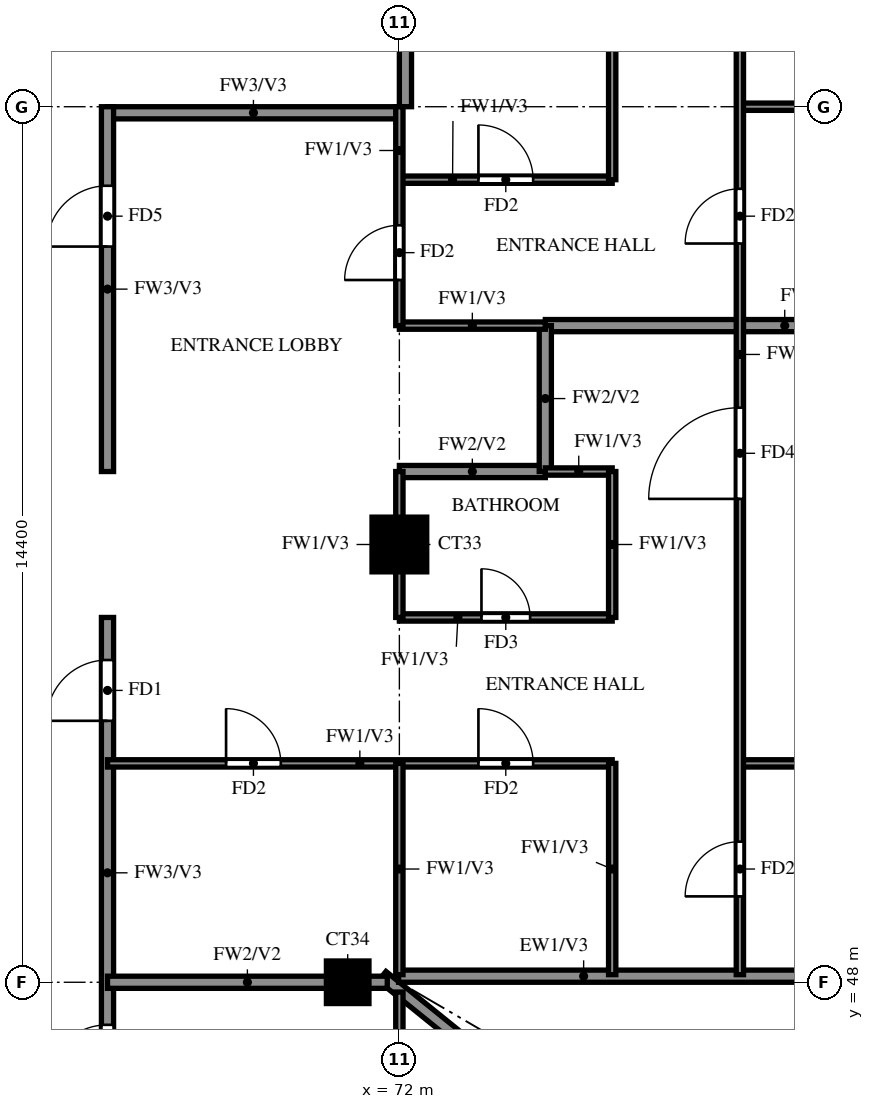
"""IFC4 building model, lengths in metres.
Left out: names, types, materials, properties, quantities, classifications, styles, units other than length and angle.
Written with IfcOpenShell. Run it as: python <this file> out.ifc"""

import sys

from ifc_helpers import new_model, si_unit, direction, frame, frame_2d, origin, origin_2d, place, context, subcontext, project, spatial, rectangle, extrude, source, transform, mapped, element, fill, save


model = new_model("IFC4")
c1 = context("Model", 3, precision=1e-05, world=origin(), true_north=direction((0.0, 1.0)))
c2 = subcontext(c1, "Body", "Model", "MODEL_VIEW")
j1 = project(units=[si_unit("LENGTHUNIT", "METRE"), si_unit("PLANEANGLEUNIT", "RADIAN")], contexts=[c1])
p1 = place(None, origin())
s1 = spatial("IfcSite", under=j1, at=p1, CompositionType="ELEMENT")
p2 = place(p1, origin())
s2 = spatial("IfcBuilding", under=s1, at=p2, CompositionType="ELEMENT")
p3 = place(p2, frame((0.0, 0.0, 211.5)))
s3 = spatial("IfcBuildingStorey", under=s2, at=p3, CompositionType="ELEMENT", Elevation=211.5)
m1 = source(origin(), c2, "Body", "SweptSolid", [
    extrude(rectangle(XDim=0.7, YDim=0.7, at=origin_2d()), origin(), (0.0, 0.0, 1.0), 3.22),
])
p4 = place(p3, frame((71.15, 48.0, 0.0), z_axis=(0.0, 0.0, 1.0), x_axis=(1.0, 0.0, 0.0)))
e1 = element("IfcColumn", 1, at=p4, inside=s3, PredefinedType="COLUMN", context=c2, shape_type="MappedRepresentation", body=[
    mapped(m1, transform((0.0, 0.0, 0.0))),
])
m2 = source(origin(), c2, "Body", "SweptSolid", [
    extrude(rectangle(XDim=0.9, YDim=0.9, at=origin_2d()), origin(), (0.0, 0.0, 1.0), 3.22),
])
p5 = place(p3, frame((72.0, 55.2, 0.0), z_axis=(0.0, 0.0, 1.0), x_axis=(1.0, 0.0, 0.0)))
e2 = element("IfcColumn", 2, at=p5, inside=s3, PredefinedType="COLUMN", context=c2, shape_type="MappedRepresentation", body=[
    mapped(m2, transform((0.0, 0.0, 0.0))),
])
p6 = place(p3, frame((81.907, 39.87, 0.0), z_axis=(0.0, 0.0, 1.0), x_axis=(-0.777936274417, 0.62834318087, 0.0)))
e3 = element("IfcWall", 3, at=p6, inside=s3, PredefinedType="SOLIDWALL", context=c2, shape_type="SweptSolid", body=[
    extrude(rectangle(XDim=13.099, YDim=0.2, at=frame_2d((6.549, 0.0))), origin(), (0.0, 0.0, 1.0), 3.22),
])
p7 = place(p6, frame((2.201, 0.0, 0.0)))
e4 = element("IfcOpeningElement", 4, at=p7, cuts=e3, PredefinedType="OPENING", context=c2, shape_type="SweptSolid", body=[
    extrude(rectangle(XDim=1.8, YDim=2.4, at=frame_2d((0.9, 1.2))), frame((0.0, 0.11, 0.0), z_axis=(0.0, -1.0, 0.0), x_axis=(1.0, 0.0, 0.0)), (0.0, 0.0, 1.0), 0.22),
])
p8 = place(p6, frame((9.938, 0.0, 1.5)))
e5 = element("IfcOpeningElement", 5, at=p8, cuts=e3, PredefinedType="OPENING", context=c2, shape_type="SweptSolid", body=[
    extrude(rectangle(XDim=0.9, YDim=0.9, at=frame_2d((0.45, 0.45))), frame((0.0, 0.11, 0.0), z_axis=(0.0, -1.0, 0.0), x_axis=(1.0, 0.0, 0.0)), (0.0, 0.0, 1.0), 0.22),
])
p9 = place(p3, frame((71.987, 48.1, 0.0), z_axis=(0.0, 0.0, 1.0), x_axis=(1.0, 0.0, 0.0)))
e6 = element("IfcWall", 6, at=p9, inside=s3, PredefinedType="SOLIDWALL", context=c2, shape_type="SweptSolid", body=[
    extrude(rectangle(XDim=6.763, YDim=0.2, at=frame_2d((3.381, 0.0))), origin(), (0.0, 0.0, 1.0), 3.22),
])
p10 = place(p3, frame((67.2, 62.3, 0.0), z_axis=(0.0, 0.0, 1.0), x_axis=(1.0, 0.0, 0.0)))
e7 = element("IfcWall", 7, at=p10, inside=s3, PredefinedType="SOLIDWALL", context=c2, shape_type="SweptSolid", body=[
    extrude(rectangle(XDim=4.8, YDim=0.2, at=frame_2d((2.4, 0.0))), origin(), (0.0, 0.0, 1.0), 3.22),
])
p11 = place(p3, frame((67.2, 45.6, 0.0), z_axis=(0.0, 0.0, 1.0), x_axis=(0.0, 1.0, 0.0)))
e8 = element("IfcWall", 8, at=p11, inside=s3, PredefinedType="SOLIDWALL", context=c2, shape_type="SweptSolid", body=[
    extrude(rectangle(XDim=8.4, YDim=0.2, at=frame_2d((4.2, 0.0))), origin(), (0.0, 0.0, 1.0), 3.22),
])
p12 = place(p11, frame((6.7, 0.0, 0.0)))
e9 = element("IfcOpeningElement", 9, at=p12, cuts=e8, PredefinedType="OPENING", context=c2, shape_type="SweptSolid", body=[
    extrude(rectangle(XDim=1.0, YDim=2.1, at=frame_2d((0.5, 1.05))), frame((0.0, 0.11, 0.0), z_axis=(0.0, -1.0, 0.0), x_axis=(1.0, 0.0, 0.0)), (0.0, 0.0, 1.0), 0.22),
])
p13 = place(p11, frame((0.7, 0.0, 0.0)))
e10 = element("IfcOpeningElement", 10, at=p13, cuts=e8, PredefinedType="OPENING", context=c2, shape_type="SweptSolid", body=[
    extrude(rectangle(XDim=1.0, YDim=2.1, at=frame_2d((0.5, 1.05))), frame((0.0, 0.11, 0.0), z_axis=(0.0, -1.0, 0.0), x_axis=(1.0, 0.0, 0.0)), (0.0, 0.0, 1.0), 0.22),
])
p14 = place(p3, frame((67.2, 56.4, 0.0), z_axis=(0.0, 0.0, 1.0), x_axis=(0.0, 1.0, 0.0)))
e11 = element("IfcWall", 11, at=p14, inside=s3, PredefinedType="SOLIDWALL", context=c2, shape_type="SweptSolid", body=[
    extrude(rectangle(XDim=6.0, YDim=0.2, at=frame_2d((3.0, 0.0))), origin(), (0.0, 0.0, 1.0), 3.22),
])
p15 = place(p14, frame((3.7, 0.0, 0.0)))
e12 = element("IfcOpeningElement", 12, at=p15, cuts=e11, PredefinedType="OPENING", context=c2, shape_type="SweptSolid", body=[
    extrude(rectangle(XDim=1.0, YDim=2.1, at=frame_2d((0.5, 1.05))), frame((0.0, 0.11, 0.0), z_axis=(0.0, -1.0, 0.0), x_axis=(1.0, 0.0, 0.0)), (0.0, 0.0, 1.0), 0.22),
])
p16 = place(p3, frame((72.1, 62.4, 0.0), z_axis=(0.0, 0.0, 1.0), x_axis=(0.0, 1.0, 0.0)))
e13 = element("IfcWall", 13, at=p16, inside=s3, PredefinedType="SOLIDWALL", context=c2, shape_type="SweptSolid", body=[
    extrude(rectangle(XDim=15.6, YDim=0.2, at=frame_2d((7.8, 0.0))), origin(), (0.0, 0.0, 1.0), 3.22),
])
p17 = place(p3, frame((67.2, 48.0, 0.0), z_axis=(0.0, 0.0, 1.0), x_axis=(1.0, 0.0, 0.0)))
e14 = element("IfcWall", 14, at=p17, inside=s3, PredefinedType="SOLIDWALL", context=c2, shape_type="SweptSolid", body=[
    extrude(rectangle(XDim=4.601, YDim=0.2, at=frame_2d((2.301, 0.0))), origin(), (0.0, 0.0, 1.0), 3.22),
])
p18 = place(p3, frame((72.0, 56.4, 0.0), z_axis=(0.0, 0.0, 1.0), x_axis=(1.0, 0.0, 0.0)))
e15 = element("IfcWall", 15, at=p18, inside=s3, PredefinedType="SOLIDWALL", context=c2, shape_type="SweptSolid", body=[
    extrude(rectangle(XDim=2.4, YDim=0.2, at=frame_2d((1.2, 0.0))), origin(), (0.0, 0.0, 1.0), 3.22),
])
p19 = place(p3, frame((74.4, 58.8, 0.0), z_axis=(0.0, 0.0, 1.0), x_axis=(1.0, 0.0, 0.0)))
e16 = element("IfcWall", 16, at=p19, inside=s3, PredefinedType="SOLIDWALL", context=c2, shape_type="SweptSolid", body=[
    extrude(rectangle(XDim=7.875, YDim=0.2, at=frame_2d((3.938, 0.0))), origin(), (0.0, 0.0, 1.0), 2.32),
])
p20 = place(p3, frame((74.4, 56.4, 0.0), z_axis=(0.0, 0.0, 1.0), x_axis=(0.0, 1.0, 0.0)))
e17 = element("IfcWall", 17, at=p20, inside=s3, PredefinedType="SOLIDWALL", context=c2, shape_type="SweptSolid", body=[
    extrude(rectangle(XDim=2.4, YDim=0.2, at=frame_2d((1.2, 0.0))), origin(), (0.0, 0.0, 1.0), 3.22),
])
p21 = place(p3, frame((67.2, 51.6, 0.0), z_axis=(0.0, 0.0, 1.0), x_axis=(1.0, 0.0, 0.0)))
e18 = element("IfcWall", 18, at=p21, inside=s3, PredefinedType="PARTITIONING", context=c2, shape_type="SweptSolid", body=[
    extrude(rectangle(XDim=8.3, YDim=0.12, at=frame_2d((4.15, 0.0))), origin(), (0.0, 0.0, 1.0), 3.22),
])
p22 = place(p21, frame((6.1, 0.0, 0.0)))
e19 = element("IfcOpeningElement", 19, at=p22, cuts=e18, PredefinedType="OPENING", context=c2, shape_type="SweptSolid", body=[
    extrude(rectangle(XDim=0.9, YDim=2.1, at=frame_2d((0.45, 1.05))), frame((0.0, 0.07, 0.0), z_axis=(0.0, -1.0, 0.0), x_axis=(1.0, 0.0, 0.0)), (0.0, 0.0, 1.0), 0.14),
])
p23 = place(p21, frame((1.95, 0.0, 0.0)))
e20 = element("IfcOpeningElement", 20, at=p23, cuts=e18, PredefinedType="OPENING", context=c2, shape_type="SweptSolid", body=[
    extrude(rectangle(XDim=0.9, YDim=2.1, at=frame_2d((0.45, 1.05))), frame((0.0, 0.07, 0.0), z_axis=(0.0, -1.0, 0.0), x_axis=(1.0, 0.0, 0.0)), (0.0, 0.0, 1.0), 0.14),
])
p24 = place(p3, frame((77.6, 51.6, 0.0), z_axis=(0.0, 0.0, 1.0), x_axis=(1.0, 0.0, 0.0)))
e21 = element("IfcWall", 21, at=p24, inside=s3, PredefinedType="PARTITIONING", context=c2, shape_type="SweptSolid", body=[
    extrude(rectangle(XDim=4.675, YDim=0.12, at=frame_2d((2.337, 0.0))), origin(), (0.0, 0.0, 1.0), 2.32),
])
p25 = place(p3, frame((72.0, 54.0, 0.0), z_axis=(0.0, 0.0, 1.0), x_axis=(1.0, 0.0, 0.0)))
e22 = element("IfcWall", 22, at=p25, inside=s3, PredefinedType="PARTITIONING", context=c2, shape_type="SweptSolid", body=[
    extrude(rectangle(XDim=3.5, YDim=0.12, at=frame_2d((1.75, 0.0))), origin(), (0.0, 0.0, 1.0), 3.22),
])
p26 = place(p25, frame((1.35, 0.0, 0.0)))
e23 = element("IfcOpeningElement", 23, at=p26, cuts=e22, PredefinedType="OPENING", context=c2, shape_type="SweptSolid", body=[
    extrude(rectangle(XDim=0.8, YDim=2.1, at=frame_2d((0.4, 1.05))), frame((0.0, 0.07, 0.0), z_axis=(0.0, -1.0, 0.0), x_axis=(1.0, 0.0, 0.0)), (0.0, 0.0, 1.0), 0.14),
])
p27 = place(p3, frame((74.4, 56.4, 0.0), z_axis=(0.0, 0.0, 1.0), x_axis=(1.0, 0.0, 0.0)))
e24 = element("IfcWall", 24, at=p27, inside=s3, PredefinedType="PARTITIONING", context=c2, shape_type="SweptSolid", body=[
    extrude(rectangle(XDim=1.1, YDim=0.12, at=frame_2d((0.55, 0.0))), origin(), (0.0, 0.0, 1.0), 3.22),
])
p28 = place(p3, frame((72.0, 58.8, 0.0), z_axis=(0.0, 0.0, 1.0), x_axis=(1.0, 0.0, 0.0)))
e25 = element("IfcWall", 25, at=p28, inside=s3, PredefinedType="PARTITIONING", context=c2, shape_type="SweptSolid", body=[
    extrude(rectangle(XDim=2.4, YDim=0.12, at=frame_2d((1.2, 0.0))), origin(), (0.0, 0.0, 1.0), 3.22),
])
p29 = place(p3, frame((72.0, 61.2, 0.0), z_axis=(0.0, 0.0, 1.0), x_axis=(1.0, 0.0, 0.0)))
e26 = element("IfcWall", 26, at=p29, inside=s3, PredefinedType="PARTITIONING", context=c2, shape_type="SweptSolid", body=[
    extrude(rectangle(XDim=3.5, YDim=0.12, at=frame_2d((1.75, 0.0))), origin(), (0.0, 0.0, 1.0), 3.22),
])
p30 = place(p29, frame((1.3, 0.0, 0.0)))
e27 = element("IfcOpeningElement", 27, at=p30, cuts=e26, PredefinedType="OPENING", context=c2, shape_type="SweptSolid", body=[
    extrude(rectangle(XDim=0.9, YDim=2.1, at=frame_2d((0.45, 1.05))), frame((0.0, 0.07, 0.0), z_axis=(0.0, -1.0, 0.0), x_axis=(1.0, 0.0, 0.0)), (0.0, 0.0, 1.0), 0.14),
])
p31 = place(p3, frame((77.6, 62.4, 0.0), z_axis=(0.0, 0.0, 1.0), x_axis=(1.0, 0.0, 0.0)))
e28 = element("IfcWall", 28, at=p31, inside=s3, PredefinedType="PARTITIONING", context=c2, shape_type="SweptSolid", body=[
    extrude(rectangle(XDim=4.675, YDim=0.12, at=frame_2d((2.337, 0.0))), origin(), (0.0, 0.0, 1.0), 3.22),
])
p32 = place(p3, frame((72.0, 39.725, 0.0), z_axis=(0.0, 0.0, 1.0), x_axis=(0.0, 1.0, 0.0)))
e29 = element("IfcWall", 29, at=p32, inside=s3, PredefinedType="PARTITIONING", context=c2, shape_type="SweptSolid", body=[
    extrude(rectangle(XDim=8.114, YDim=0.12, at=frame_2d((4.057, 0.0))), origin(), (0.0, 0.0, 1.0), 2.32),
])
p33 = place(p32, frame((1.788, 0.0, 0.0)))
e30 = element("IfcOpeningElement", 30, at=p33, cuts=e29, PredefinedType="OPENING", context=c2, shape_type="SweptSolid", body=[
    extrude(rectangle(XDim=1.5, YDim=2.1, at=frame_2d((0.75, 1.05))), frame((0.0, 0.07, 0.0), z_axis=(0.0, -1.0, 0.0), x_axis=(1.0, 0.0, 0.0)), (0.0, 0.0, 1.0), 0.14),
])
p34 = place(p32, frame((4.575, 0.0, 0.0)))
e31 = element("IfcOpeningElement", 31, at=p34, cuts=e29, PredefinedType="OPENING", context=c2, shape_type="SweptSolid", body=[
    extrude(rectangle(XDim=0.8, YDim=2.1, at=frame_2d((0.4, 1.05))), frame((0.0, 0.07, 0.0), z_axis=(0.0, -1.0, 0.0), x_axis=(1.0, 0.0, 0.0)), (0.0, 0.0, 1.0), 0.14),
])
p35 = place(p3, frame((72.0, 48.125, 0.0), z_axis=(0.0, 0.0, 1.0), x_axis=(0.0, 1.0, 0.0)))
e32 = element("IfcWall", 32, at=p35, inside=s3, PredefinedType="PARTITIONING", context=c2, shape_type="SweptSolid", body=[
    extrude(rectangle(XDim=3.475, YDim=0.12, at=frame_2d((1.738, 0.0))), origin(), (0.0, 0.0, 1.0), 3.22),
])
p36 = place(p3, frame((72.0, 54.0, 0.0), z_axis=(0.0, 0.0, 1.0), x_axis=(0.0, 1.0, 0.0)))
e33 = element("IfcWall", 33, at=p36, inside=s3, PredefinedType="PARTITIONING", context=c2, shape_type="SweptSolid", body=[
    extrude(rectangle(XDim=2.4, YDim=0.12, at=frame_2d((1.2, 0.0))), origin(), (0.0, 0.0, 1.0), 3.22),
])
p37 = place(p3, frame((72.0, 58.8, 0.0), z_axis=(0.0, 0.0, 1.0), x_axis=(0.0, 1.0, 0.0)))
e34 = element("IfcWall", 34, at=p37, inside=s3, PredefinedType="PARTITIONING", context=c2, shape_type="SweptSolid", body=[
    extrude(rectangle(XDim=3.6, YDim=0.12, at=frame_2d((1.8, 0.0))), origin(), (0.0, 0.0, 1.0), 3.22),
])
p38 = place(p37, frame((0.75, 0.0, 0.0)))
e35 = element("IfcOpeningElement", 35, at=p38, cuts=e34, PredefinedType="OPENING", context=c2, shape_type="SweptSolid", body=[
    extrude(rectangle(XDim=0.9, YDim=2.1, at=frame_2d((0.45, 1.05))), frame((0.0, 0.07, 0.0), z_axis=(0.0, -1.0, 0.0), x_axis=(1.0, 0.0, 0.0)), (0.0, 0.0, 1.0), 0.14),
])
p39 = place(p3, frame((75.5, 48.125, 0.0), z_axis=(0.0, 0.0, 1.0), x_axis=(0.0, 1.0, 0.0)))
e36 = element("IfcWall", 36, at=p39, inside=s3, PredefinedType="PARTITIONING", context=c2, shape_type="SweptSolid", body=[
    extrude(rectangle(XDim=3.475, YDim=0.12, at=frame_2d((1.738, 0.0))), origin(), (0.0, 0.0, 1.0), 3.22),
])
p40 = place(p3, frame((75.5, 54.0, 0.0), z_axis=(0.0, 0.0, 1.0), x_axis=(0.0, 1.0, 0.0)))
e37 = element("IfcWall", 37, at=p40, inside=s3, PredefinedType="PARTITIONING", context=c2, shape_type="SweptSolid", body=[
    extrude(rectangle(XDim=2.4, YDim=0.12, at=frame_2d((1.2, 0.0))), origin(), (0.0, 0.0, 1.0), 3.22),
])
p41 = place(p3, frame((75.5, 61.2, 0.0), z_axis=(0.0, 0.0, 1.0), x_axis=(0.0, 1.0, 0.0)))
e38 = element("IfcWall", 38, at=p41, inside=s3, PredefinedType="PARTITIONING", context=c2, shape_type="SweptSolid", body=[
    extrude(rectangle(XDim=12.0, YDim=0.12, at=frame_2d((6.0, 0.0))), origin(), (0.0, 0.0, 1.0), 3.22),
])
p42 = place(p41, frame((4.2, 0.0, 0.0)))
e39 = element("IfcOpeningElement", 39, at=p42, cuts=e38, PredefinedType="OPENING", context=c2, shape_type="SweptSolid", body=[
    extrude(rectangle(XDim=0.9, YDim=2.1, at=frame_2d((0.45, 1.05))), frame((0.0, 0.07, 0.0), z_axis=(0.0, -1.0, 0.0), x_axis=(1.0, 0.0, 0.0)), (0.0, 0.0, 1.0), 0.14),
])
p43 = place(p41, frame((7.975, 0.0, 0.0)))
e40 = element("IfcOpeningElement", 40, at=p43, cuts=e38, PredefinedType="OPENING", context=c2, shape_type="SweptSolid", body=[
    extrude(rectangle(XDim=0.8, YDim=2.1, at=frame_2d((0.4, 1.05))), frame((0.0, 0.07, 0.0), z_axis=(0.0, -1.0, 0.0), x_axis=(1.0, 0.0, 0.0)), (0.0, 0.0, 1.0), 0.14),
])
p44 = place(p41, frame((10.45, 0.0, 0.0)))
e41 = element("IfcOpeningElement", 41, at=p44, cuts=e38, PredefinedType="OPENING", context=c2, shape_type="SweptSolid", body=[
    extrude(rectangle(XDim=0.8, YDim=2.1, at=frame_2d((0.4, 1.05))), frame((0.0, 0.07, 0.0), z_axis=(0.0, -1.0, 0.0), x_axis=(1.0, 0.0, 0.0)), (0.0, 0.0, 1.0), 0.14),
])
p45 = place(p3, frame((77.6, 48.125, 0.0), z_axis=(0.0, 0.0, 1.0), x_axis=(0.0, 1.0, 0.0)))
e42 = element("IfcWall", 42, at=p45, inside=s3, PredefinedType="PARTITIONING", context=c2, shape_type="SweptSolid", body=[
    extrude(rectangle(XDim=21.475, YDim=0.12, at=frame_2d((10.738, 0.0))), origin(), (0.0, 0.0, 1.0), 3.22),
])
p46 = place(p45, frame((1.288, 0.0, 0.0)))
e43 = element("IfcOpeningElement", 43, at=p46, cuts=e42, PredefinedType="OPENING", context=c2, shape_type="SweptSolid", body=[
    extrude(rectangle(XDim=0.9, YDim=2.1, at=frame_2d((0.45, 1.05))), frame((0.0, 0.07, 0.0), z_axis=(0.0, -1.0, 0.0), x_axis=(1.0, 0.0, 0.0)), (0.0, 0.0, 1.0), 0.14),
])
p47 = place(p45, frame((7.825, 0.0, 0.0)))
e44 = element("IfcOpeningElement", 44, at=p47, cuts=e42, PredefinedType="OPENING", context=c2, shape_type="SweptSolid", body=[
    extrude(rectangle(XDim=1.5, YDim=2.1, at=frame_2d((0.75, 1.05))), frame((0.0, 0.07, 0.0), z_axis=(0.0, -1.0, 0.0), x_axis=(1.0, 0.0, 0.0)), (0.0, 0.0, 1.0), 0.14),
])
p48 = place(p45, frame((12.025, 0.0, 0.0)))
e45 = element("IfcOpeningElement", 45, at=p48, cuts=e42, PredefinedType="OPENING", context=c2, shape_type="SweptSolid", body=[
    extrude(rectangle(XDim=0.9, YDim=2.1, at=frame_2d((0.45, 1.05))), frame((0.0, 0.07, 0.0), z_axis=(0.0, -1.0, 0.0), x_axis=(1.0, 0.0, 0.0)), (0.0, 0.0, 1.0), 0.14),
])
p49 = place(p45, frame((17.425, 0.0, 0.0)))
e46 = element("IfcOpeningElement", 46, at=p49, cuts=e42, PredefinedType="OPENING", context=c2, shape_type="SweptSolid", body=[
    extrude(rectangle(XDim=0.9, YDim=2.1, at=frame_2d((0.45, 1.05))), frame((0.0, 0.07, 0.0), z_axis=(0.0, -1.0, 0.0), x_axis=(1.0, 0.0, 0.0)), (0.0, 0.0, 1.0), 0.14),
])
p50 = place(p12, origin())
e47 = element("IfcDoor", 47, at=p50, inside=s3, OperationType="SINGLE_SWING_RIGHT", PredefinedType="DOOR", context=c2, shape_type="SweptSolid", body=[
    extrude(rectangle(XDim=1.0, YDim=2.1, at=frame_2d((0.5, 1.05))), frame((0.0, 0.025, 0.0), z_axis=(0.0, -1.0, 0.0), x_axis=(1.0, 0.0, 0.0)), (0.0, 0.0, 1.0), 0.05),
])
fill(e9, e47)
p51 = place(p46, origin())
e48 = element("IfcDoor", 48, at=p51, inside=s3, OperationType="SINGLE_SWING_LEFT", PredefinedType="DOOR", context=c2, shape_type="SweptSolid", body=[
    extrude(rectangle(XDim=0.9, YDim=2.1, at=frame_2d((0.45, 1.05))), frame((0.0, 0.025, 0.0), z_axis=(0.0, -1.0, 0.0), x_axis=(1.0, 0.0, 0.0)), (0.0, 0.0, 1.0), 0.05),
])
fill(e43, e48)
p52 = place(p47, origin())
e49 = element("IfcDoor", 49, at=p52, inside=s3, OperationType="SINGLE_SWING_RIGHT", PredefinedType="DOOR", context=c2, shape_type="SweptSolid", body=[
    extrude(rectangle(XDim=1.5, YDim=2.1, at=frame_2d((0.75, 1.05))), frame((0.0, 0.025, 0.0), z_axis=(0.0, -1.0, 0.0), x_axis=(1.0, 0.0, 0.0)), (0.0, 0.0, 1.0), 0.05),
])
fill(e44, e49)
p53 = place(p22, origin())
e50 = element("IfcDoor", 50, at=p53, inside=s3, OperationType="SINGLE_SWING_RIGHT", PredefinedType="DOOR", context=c2, shape_type="SweptSolid", body=[
    extrude(rectangle(XDim=0.9, YDim=2.1, at=frame_2d((0.45, 1.05))), frame((0.0, 0.025, 0.0), z_axis=(0.0, -1.0, 0.0), x_axis=(1.0, 0.0, 0.0)), (0.0, 0.0, 1.0), 0.05),
])
fill(e19, e50)
p54 = place(p26, origin())
e51 = element("IfcDoor", 51, at=p54, inside=s3, OperationType="SINGLE_SWING_LEFT", PredefinedType="DOOR", context=c2, shape_type="SweptSolid", body=[
    extrude(rectangle(XDim=0.8, YDim=2.1, at=frame_2d((0.4, 1.05))), frame((0.0, 0.025, 0.0), z_axis=(0.0, -1.0, 0.0), x_axis=(1.0, 0.0, 0.0)), (0.0, 0.0, 1.0), 0.05),
])
fill(e23, e51)
p55 = place(p23, origin())
e52 = element("IfcDoor", 52, at=p55, inside=s3, OperationType="SINGLE_SWING_LEFT", PredefinedType="DOOR", context=c2, shape_type="SweptSolid", body=[
    extrude(rectangle(XDim=0.9, YDim=2.1, at=frame_2d((0.45, 1.05))), frame((0.0, 0.025, 0.0), z_axis=(0.0, -1.0, 0.0), x_axis=(1.0, 0.0, 0.0)), (0.0, 0.0, 1.0), 0.05),
])
fill(e20, e52)
p56 = place(p38, origin())
e53 = element("IfcDoor", 53, at=p56, inside=s3, OperationType="SINGLE_SWING_LEFT", PredefinedType="DOOR", context=c2, shape_type="SweptSolid", body=[
    extrude(rectangle(XDim=0.9, YDim=2.1, at=frame_2d((0.45, 1.05))), frame((0.0, 0.025, 0.0), z_axis=(0.0, -1.0, 0.0), x_axis=(1.0, 0.0, 0.0)), (0.0, 0.0, 1.0), 0.05),
])
fill(e35, e53)
p57 = place(p15, origin())
e54 = element("IfcDoor", 54, at=p57, inside=s3, OperationType="SINGLE_SWING_LEFT", PredefinedType="DOOR", context=c2, shape_type="SweptSolid", body=[
    extrude(rectangle(XDim=1.0, YDim=2.1, at=frame_2d((0.5, 1.05))), frame((0.0, 0.025, 0.0), z_axis=(0.0, -1.0, 0.0), x_axis=(1.0, 0.0, 0.0)), (0.0, 0.0, 1.0), 0.05),
])
fill(e12, e54)
p58 = place(p48, origin())
e55 = element("IfcDoor", 55, at=p58, inside=s3, OperationType="SINGLE_SWING_RIGHT", PredefinedType="DOOR", context=c2, shape_type="SweptSolid", body=[
    extrude(rectangle(XDim=0.9, YDim=2.1, at=frame_2d((0.45, 1.05))), frame((0.0, 0.025, 0.0), z_axis=(0.0, -1.0, 0.0), x_axis=(1.0, 0.0, 0.0)), (0.0, 0.0, 1.0), 0.05),
])
fill(e45, e55)
p59 = place(p30, origin())
e56 = element("IfcDoor", 56, at=p59, inside=s3, OperationType="SINGLE_SWING_LEFT", PredefinedType="DOOR", context=c2, shape_type="SweptSolid", body=[
    extrude(rectangle(XDim=0.9, YDim=2.1, at=frame_2d((0.45, 1.05))), frame((0.0, 0.025, 0.0), z_axis=(0.0, -1.0, 0.0), x_axis=(1.0, 0.0, 0.0)), (0.0, 0.0, 1.0), 0.05),
])
fill(e27, e56)
p60 = place(p13, origin())
e57 = element("IfcDoor", 57, at=p60, inside=s3, OperationType="SINGLE_SWING_LEFT", PredefinedType="DOOR", context=c2, shape_type="SweptSolid", body=[
    extrude(rectangle(XDim=1.0, YDim=2.1, at=frame_2d((0.5, 1.05))), frame((0.0, 0.025, 0.0), z_axis=(0.0, -1.0, 0.0), x_axis=(1.0, 0.0, 0.0)), (0.0, 0.0, 1.0), 0.05),
])
fill(e10, e57)
save(model, sys.argv[1])
